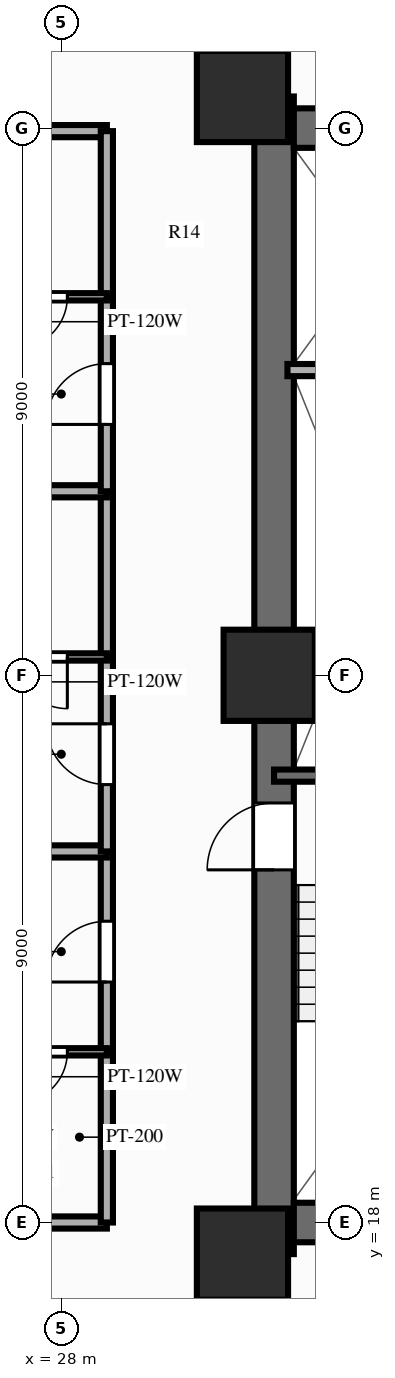
"""IFC4 building model, lengths in metres.
Left out: names, types, materials, properties, quantities, classifications, styles, units other than length and angle.
Written with IfcOpenShell. Run it as: python <this file> out.ifc"""

import sys

from ifc_helpers import new_model, si_unit, direction, frame, frame_2d, origin, origin_2d, place, context, subcontext, project, spatial, rectangle, extrude, source, transform, mapped, element, fill, save


model = new_model("IFC4")
c1 = context("Model", 3, precision=1e-05, world=origin(), true_north=direction((0.0, 1.0)))
c2 = subcontext(c1, "Body", "Model", "MODEL_VIEW")
j1 = project(units=[si_unit("LENGTHUNIT", "METRE"), si_unit("PLANEANGLEUNIT", "RADIAN")], contexts=[c1])
p1 = place(None, origin())
s1 = spatial("IfcSite", under=j1, at=p1, CompositionType="ELEMENT")
p2 = place(p1, origin())
s2 = spatial("IfcBuilding", under=s1, at=p2, CompositionType="ELEMENT")
p3 = place(p2, frame((0.0, 0.0, 34.4)))
s3 = spatial("IfcBuildingStorey", under=s2, at=p3, CompositionType="ELEMENT", Elevation=34.4)
p4 = place(p3, frame((31.5, 17.48, 0.0), z_axis=(0.0, 0.0, 1.0), x_axis=(0.0, 1.0, 0.0)))
e1 = element("IfcWall", 1, at=p4, inside=s3, PredefinedType="SHEAR", context=c2, shape_type="SweptSolid", body=[
    extrude(rectangle(XDim=19.04, YDim=0.65, at=frame_2d((9.52, 0.0))), origin(), (0.0, 0.0, 1.0), 3.0),
])
p5 = place(p4, frame((6.32, 0.0, 0.0)))
e2 = element("IfcOpeningElement", 2, at=p5, cuts=e1, PredefinedType="OPENING", context=c2, shape_type="SweptSolid", body=[
    extrude(rectangle(XDim=1.1, YDim=2.15, at=frame_2d((0.55, 1.075))), frame((0.0, 0.337, 0.0), z_axis=(0.0, -1.0, 0.0), x_axis=(1.0, 0.0, 0.0)), (0.0, 0.0, 1.0), 0.674),
])
p6 = place(p3, frame((31.825, 18.0, 0.0), z_axis=(0.0, 0.0, 1.0), x_axis=(1.0, 0.0, 0.0)))
e3 = element("IfcWall", 3, at=p6, inside=s3, PredefinedType="SHEAR", context=c2, shape_type="SweptSolid", body=[
    extrude(rectangle(XDim=12.35, YDim=0.65, at=frame_2d((6.175, 0.0))), origin(), (0.0, 0.0, 1.0), 3.0),
])
p7 = place(p3, frame((31.825, 36.0, 0.0), z_axis=(0.0, 0.0, 1.0), x_axis=(1.0, 0.0, 0.0)))
e4 = element("IfcWall", 4, at=p7, inside=s3, PredefinedType="SHEAR", context=c2, shape_type="SweptSolid", body=[
    extrude(rectangle(XDim=12.35, YDim=0.65, at=frame_2d((6.175, 0.0))), origin(), (0.0, 0.0, 1.0), 3.0),
])
p8 = place(p7, frame((5.125, 0.0, 0.0), z_axis=(0.0, 0.0, 1.0), x_axis=(-1.0, 0.0, 0.0)))
e5 = element("IfcOpeningElement", 5, at=p8, cuts=e4, PredefinedType="OPENING", context=c2, shape_type="SweptSolid", body=[
    extrude(rectangle(XDim=1.4, YDim=2.15, at=frame_2d((0.7, 1.075))), frame((0.0, 0.337, 0.0), z_axis=(0.0, -1.0, 0.0), x_axis=(1.0, 0.0, 0.0)), (0.0, 0.0, 1.0), 0.674),
])
m1 = source(origin(), c2, "Body", "SweptSolid", [
    extrude(rectangle(XDim=1.5, YDim=1.5, at=origin_2d()), origin(), (0.0, 0.0, 1.0), 3.0),
])
for number, where, z_axis, x_axis in (
    (6, (30.98, 17.48, 0.0), (0.0, 0.0, 1.0), (1.0, 0.0, 0.0)),
    (7, (30.98, 36.52, 0.0), (0.0, 0.0, 1.0), (1.0, 0.0, 0.0)),
    (8, (31.42, 27.0, 0.0), (0.0, 0.0, 1.0), (1.0, 0.0, 0.0)),
):
    element("IfcColumn", number, at=place(p3, frame(where, z_axis=z_axis, x_axis=x_axis)), inside=s3, PredefinedType="COLUMN", context=c2, shape_type="MappedRepresentation", body=[
        mapped(m1, transform((0.0, 0.0, 0.0), scale=1.0)),
    ])
p9 = place(p3, frame((31.5, 25.35, 0.0), z_axis=(0.0, 0.0, 1.0), x_axis=(1.0, 0.0, 0.0)))
e9 = element("IfcWall", 9, at=p9, inside=s3, PredefinedType="SOLIDWALL", context=c2, shape_type="SweptSolid", body=[
    extrude(rectangle(XDim=3.93, YDim=0.2, at=frame_2d((1.965, 0.0))), origin(), (0.0, 0.0, 1.0), 2.79),
])
p10 = place(p3, frame((31.72, 32.02, 0.0), z_axis=(0.0, 0.0, 1.0), x_axis=(1.0, 0.0, 0.0)))
e10 = element("IfcWall", 10, at=p10, inside=s3, PredefinedType="PARTITIONING", context=c2, shape_type="SweptSolid", body=[
    extrude(rectangle(XDim=2.8, YDim=0.2, at=frame_2d((1.4, 0.0))), origin(), (0.0, 0.0, 1.0), 2.79),
])
for number, where, z_axis, x_axis in (
    (11, (28.75, 18.0, 0.0), (0.0, 0.0, 1.0), (-1.0, 0.0, 0.0)),
    (12, (28.75, 35.95, 0.0), (0.0, 0.0, 1.0), (-1.0, 0.0, 0.0)),
):
    element("IfcWall", number, at=place(p3, frame(where, z_axis=z_axis, x_axis=x_axis)), inside=s3, PredefinedType="PARTITIONING", context=c2, shape_type="SweptSolid", body=[
        extrude(rectangle(XDim=16.6, YDim=0.2, at=frame_2d((8.3, 0.0))), origin(), (0.0, 0.0, 1.0), 2.24),
    ])
p11 = place(p3, frame((28.75, 18.0, 0.0), z_axis=(0.0, 0.0, 1.0), x_axis=(0.0, 1.0, 0.0)))
e13 = element("IfcWall", 13, at=p11, inside=s3, PredefinedType="PARTITIONING", context=c2, shape_type="SweptSolid", body=[
    extrude(rectangle(XDim=2.807, YDim=0.2, at=frame_2d((1.404, 0.0))), origin(), (0.0, 0.0, 1.0), 2.79),
])
p12 = place(p3, frame((28.75, 20.807, 0.0), z_axis=(0.0, 0.0, 1.0), x_axis=(0.0, 1.0, 0.0)))
e14 = element("IfcWall", 14, at=p12, inside=s3, PredefinedType="PARTITIONING", context=c2, shape_type="SweptSolid", body=[
    extrude(rectangle(XDim=3.296, YDim=0.2, at=frame_2d((1.648, 0.0))), origin(), (0.0, 0.0, 1.0), 2.79),
])
p13 = place(p12, frame((1.148, 0.0, 0.0)))
e15 = element("IfcOpeningElement", 15, at=p13, cuts=e14, PredefinedType="OPENING", context=c2, shape_type="SweptSolid", body=[
    extrude(rectangle(XDim=1.0, YDim=2.15, at=frame_2d((0.5, 1.075))), frame((0.0, 0.112, 0.0), z_axis=(0.0, -1.0, 0.0), x_axis=(1.0, 0.0, 0.0)), (0.0, 0.0, 1.0), 0.224),
])
p14 = place(p3, frame((28.75, 20.807, 0.0), z_axis=(0.0, 0.0, 1.0), x_axis=(-1.0, 0.0, 0.0)))
e16 = element("IfcWall", 16, at=p14, inside=s3, PredefinedType="PARTITIONING", context=c2, shape_type="SweptSolid", body=[
    extrude(rectangle(XDim=2.15, YDim=0.12, at=frame_2d((1.075, 0.0))), origin(), (0.0, 0.0, 1.0), 2.79),
])
p15 = place(p14, frame((0.65, 0.0, 0.0)))
e17 = element("IfcOpeningElement", 17, at=p15, cuts=e16, PredefinedType="OPENING", context=c2, shape_type="SweptSolid", body=[
    extrude(rectangle(XDim=0.85, YDim=2.05, at=frame_2d((0.425, 1.025))), frame((0.0, 0.072, 0.0), z_axis=(0.0, -1.0, 0.0), x_axis=(1.0, 0.0, 0.0)), (0.0, 0.0, 1.0), 0.144),
])
p16 = place(p3, frame((28.75, 24.103, 0.0), z_axis=(0.0, 0.0, 1.0), x_axis=(-1.0, 0.0, 0.0)))
e18 = element("IfcWall", 18, at=p16, inside=s3, PredefinedType="PARTITIONING", context=c2, shape_type="SweptSolid", body=[
    extrude(rectangle(XDim=16.6, YDim=0.2, at=frame_2d((8.3, 0.0))), origin(), (0.0, 0.0, 1.0), 2.79),
])
p17 = place(p3, frame((28.75, 24.103, 0.0), z_axis=(0.0, 0.0, 1.0), x_axis=(0.0, 1.0, 0.0)))
e19 = element("IfcWall", 19, at=p17, inside=s3, PredefinedType="PARTITIONING", context=c2, shape_type="SweptSolid", body=[
    extrude(rectangle(XDim=3.199, YDim=0.2, at=frame_2d((1.599, 0.0))), origin(), (0.0, 0.0, 1.0), 2.79),
])
p18 = place(p17, frame((1.099, 0.0, 0.0)))
e20 = element("IfcOpeningElement", 20, at=p18, cuts=e19, PredefinedType="OPENING", context=c2, shape_type="SweptSolid", body=[
    extrude(rectangle(XDim=1.0, YDim=2.15, at=frame_2d((0.5, 1.075))), frame((0.0, 0.112, 0.0), z_axis=(0.0, -1.0, 0.0), x_axis=(1.0, 0.0, 0.0)), (0.0, 0.0, 1.0), 0.224),
])
p19 = place(p3, frame((28.75, 27.302, 0.0), z_axis=(0.0, 0.0, 1.0), x_axis=(0.0, 1.0, 0.0)))
e21 = element("IfcWall", 21, at=p19, inside=s3, PredefinedType="PARTITIONING", context=c2, shape_type="SweptSolid", body=[
    extrude(rectangle(XDim=2.725, YDim=0.2, at=frame_2d((1.362, 0.0))), origin(), (0.0, 0.0, 1.0), 2.79),
])
p20 = place(p3, frame((28.75, 27.302, 0.0), z_axis=(0.0, 0.0, 1.0), x_axis=(-1.0, 0.0, 0.0)))
e22 = element("IfcWall", 22, at=p20, inside=s3, PredefinedType="PARTITIONING", context=c2, shape_type="SweptSolid", body=[
    extrude(rectangle(XDim=2.15, YDim=0.12, at=frame_2d((1.075, 0.0))), origin(), (0.0, 0.0, 1.0), 2.79),
])
p21 = place(p20, frame((0.65, 0.0, 0.0)))
e23 = element("IfcOpeningElement", 23, at=p21, cuts=e22, PredefinedType="OPENING", context=c2, shape_type="SweptSolid", body=[
    extrude(rectangle(XDim=0.85, YDim=2.05, at=frame_2d((0.425, 1.025))), frame((0.0, 0.072, 0.0), z_axis=(0.0, -1.0, 0.0), x_axis=(1.0, 0.0, 0.0)), (0.0, 0.0, 1.0), 0.144),
])
p22 = place(p3, frame((28.75, 30.027, 0.0), z_axis=(0.0, 0.0, 1.0), x_axis=(-1.0, 0.0, 0.0)))
e24 = element("IfcWall", 24, at=p22, inside=s3, PredefinedType="PARTITIONING", context=c2, shape_type="SweptSolid", body=[
    extrude(rectangle(XDim=16.6, YDim=0.2, at=frame_2d((8.3, 0.0))), origin(), (0.0, 0.0, 1.0), 2.79),
])
p23 = place(p3, frame((28.75, 30.027, 0.0), z_axis=(0.0, 0.0, 1.0), x_axis=(0.0, 1.0, 0.0)))
e25 = element("IfcWall", 25, at=p23, inside=s3, PredefinedType="PARTITIONING", context=c2, shape_type="SweptSolid", body=[
    extrude(rectangle(XDim=3.198, YDim=0.2, at=frame_2d((1.599, 0.0))), origin(), (0.0, 0.0, 1.0), 2.79),
])
p24 = place(p23, frame((1.099, 0.0, 0.0)))
e26 = element("IfcOpeningElement", 26, at=p24, cuts=e25, PredefinedType="OPENING", context=c2, shape_type="SweptSolid", body=[
    extrude(rectangle(XDim=1.0, YDim=2.15, at=frame_2d((0.5, 1.075))), frame((0.0, 0.112, 0.0), z_axis=(0.0, -1.0, 0.0), x_axis=(1.0, 0.0, 0.0)), (0.0, 0.0, 1.0), 0.224),
])
p25 = place(p3, frame((28.75, 33.225, 0.0), z_axis=(0.0, 0.0, 1.0), x_axis=(0.0, 1.0, 0.0)))
e27 = element("IfcWall", 27, at=p25, inside=s3, PredefinedType="PARTITIONING", context=c2, shape_type="SweptSolid", body=[
    extrude(rectangle(XDim=2.725, YDim=0.2, at=frame_2d((1.362, 0.0))), origin(), (0.0, 0.0, 1.0), 2.79),
])
p26 = place(p3, frame((28.75, 33.225, 0.0), z_axis=(0.0, 0.0, 1.0), x_axis=(-1.0, 0.0, 0.0)))
e28 = element("IfcWall", 28, at=p26, inside=s3, PredefinedType="PARTITIONING", context=c2, shape_type="SweptSolid", body=[
    extrude(rectangle(XDim=2.15, YDim=0.12, at=frame_2d((1.075, 0.0))), origin(), (0.0, 0.0, 1.0), 2.79),
])
p27 = place(p26, frame((0.65, 0.0, 0.0)))
e29 = element("IfcOpeningElement", 29, at=p27, cuts=e28, PredefinedType="OPENING", context=c2, shape_type="SweptSolid", body=[
    extrude(rectangle(XDim=0.85, YDim=2.05, at=frame_2d((0.425, 1.025))), frame((0.0, 0.072, 0.0), z_axis=(0.0, -1.0, 0.0), x_axis=(1.0, 0.0, 0.0)), (0.0, 0.0, 1.0), 0.144),
])
m2 = source(origin(), c2, "Body", "SweptSolid", [
    extrude(rectangle(XDim=1.1, YDim=2.15, at=frame_2d((0.55, 1.075))), frame((0.0, 0.025, 0.0), z_axis=(0.0, -1.0, 0.0), x_axis=(1.0, 0.0, 0.0)), (0.0, 0.0, 1.0), 0.05),
])
p28 = place(p5, origin())
e30 = element("IfcDoor", 30, at=p28, inside=s3, OperationType="SINGLE_SWING_LEFT", PredefinedType="DOOR", context=c2, shape_type="MappedRepresentation", body=[
    mapped(m2, transform((0.0, 0.0, 0.0), scale=1.0)),
])
fill(e2, e30)
m3 = source(origin(), c2, "Body", "SweptSolid", [
    extrude(rectangle(XDim=1.0, YDim=2.15, at=frame_2d((0.5, 1.075))), frame((0.0, 0.025, 0.0), z_axis=(0.0, -1.0, 0.0), x_axis=(1.0, 0.0, 0.0)), (0.0, 0.0, 1.0), 0.05),
])
p29 = place(p13, origin())
e31 = element("IfcDoor", 31, at=p29, inside=s3, OperationType="SINGLE_SWING_LEFT", PredefinedType="DOOR", context=c2, shape_type="MappedRepresentation", body=[
    mapped(m3, transform((0.0, 0.0, 0.0), scale=1.0)),
])
fill(e15, e31)
m4 = source(origin(), c2, "Body", "SweptSolid", [
    extrude(rectangle(XDim=0.85, YDim=2.05, at=frame_2d((0.425, 1.025))), frame((0.0, 0.025, 0.0), z_axis=(0.0, -1.0, 0.0), x_axis=(1.0, 0.0, 0.0)), (0.0, 0.0, 1.0), 0.05),
])
p30 = place(p15, origin())
e32 = element("IfcDoor", 32, at=p30, inside=s3, OperationType="SINGLE_SWING_RIGHT", PredefinedType="DOOR", context=c2, shape_type="MappedRepresentation", body=[
    mapped(m4, transform((0.0, 0.0, 0.0), scale=1.0)),
])
fill(e17, e32)
p31 = place(p18, origin())
e33 = element("IfcDoor", 33, at=p31, inside=s3, OperationType="SINGLE_SWING_RIGHT", PredefinedType="DOOR", context=c2, shape_type="MappedRepresentation", body=[
    mapped(m3, transform((0.0, 0.0, 0.0), scale=1.0)),
])
fill(e20, e33)
p32 = place(p21, origin())
e34 = element("IfcDoor", 34, at=p32, inside=s3, OperationType="SINGLE_SWING_LEFT", PredefinedType="DOOR", context=c2, shape_type="MappedRepresentation", body=[
    mapped(m4, transform((0.0, 0.0, 0.0), scale=1.0)),
])
fill(e23, e34)
p33 = place(p24, origin())
e35 = element("IfcDoor", 35, at=p33, inside=s3, OperationType="SINGLE_SWING_LEFT", PredefinedType="DOOR", context=c2, shape_type="MappedRepresentation", body=[
    mapped(m3, transform((0.0, 0.0, 0.0), scale=1.0)),
])
fill(e26, e35)
p34 = place(p27, origin())
e36 = element("IfcDoor", 36, at=p34, inside=s3, OperationType="SINGLE_SWING_RIGHT", PredefinedType="DOOR", context=c2, shape_type="MappedRepresentation", body=[
    mapped(m4, transform((0.0, 0.0, 0.0), scale=1.0)),
])
fill(e29, e36)
save(model, sys.argv[1])
